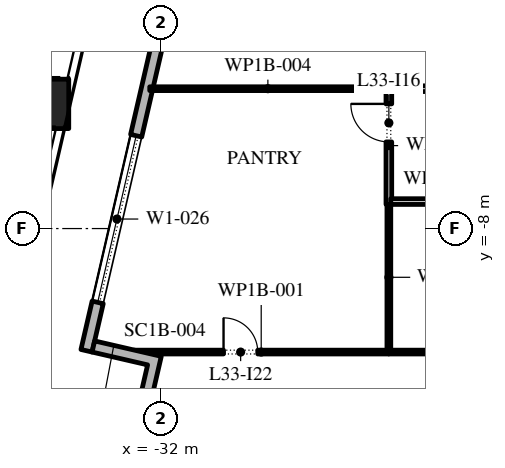
"""IFC4 building model, lengths in metres.
Left out: names, types, materials, properties, quantities, classifications, styles, units other than length and angle.
Written with IfcOpenShell. Run it as: python <this file> out.ifc"""

import sys

from ifc_helpers import new_model, si_unit, direction, frame, frame_2d, origin, origin_2d, place, context, subcontext, project, spatial, polyline, rectangle, outline, extrude, element, fill, save


model = new_model("IFC4")
c1 = context("Model", 3, precision=1e-05, world=origin(), true_north=direction((0.0, 1.0)))
c2 = subcontext(c1, "Body", "Model", "MODEL_VIEW")
j1 = project(units=[si_unit("LENGTHUNIT", "METRE"), si_unit("PLANEANGLEUNIT", "RADIAN")], contexts=[c1])
p1 = place(None, origin())
s1 = spatial("IfcSite", under=j1, at=p1, CompositionType="ELEMENT")
p2 = place(p1, origin())
s2 = spatial("IfcBuilding", under=s1, at=p2, CompositionType="ELEMENT")
p3 = place(p2, frame((0.0, 0.0, 151.8)))
s3 = spatial("IfcBuildingStorey", under=s2, at=p3, CompositionType="ELEMENT", Elevation=151.8)
p4 = place(p3, frame((-35.073, -4.72, 0.0), z_axis=(0.002964348167, 0.012671135303, 0.9999153239), x_axis=(-0.973709261374, 0.227794368487, 0.0)))
e1 = element("IfcColumn", 1, at=p4, inside=s3, PredefinedType="COLUMN", context=c2, shape_type="SweptSolid", body=[
    extrude(rectangle(XDim=1.3, YDim=1.3, at=origin_2d()), origin(), (0.0, 0.0, 1.0), 4.2),
])
p5 = place(p3, frame((-22.82, 37.016, 0.0), z_axis=(0.0, 0.0, 1.0), x_axis=(-0.224953880882, -0.974369412223, 0.0)))
e2 = element("IfcWall", 2, at=p5, inside=s3, PredefinedType="STANDARD", context=c2, shape_type="SweptSolid", body=[
    extrude(rectangle(XDim=49.5, YDim=0.3, at=frame_2d((24.75, 0.0))), origin(), (0.0, 0.0, 1.0), 3.95),
])
p6 = place(p5, frame((1.157, 0.0, 0.45)))
e3 = element("IfcOpeningElement", 3, at=p6, cuts=e2, PredefinedType="OPENING", context=c2, shape_type="SweptSolid", body=[
    extrude(rectangle(XDim=4.5, YDim=3.05, at=frame_2d((2.25, 1.525))), frame((0.0, 0.16, 0.0), z_axis=(0.0, -1.0, 0.0), x_axis=(1.0, 0.0, 0.0)), (0.0, 0.0, 1.0), 0.32),
])
p7 = place(p5, frame((8.121, 0.0, 0.45)))
e4 = element("IfcOpeningElement", 4, at=p7, cuts=e2, PredefinedType="OPENING", context=c2, shape_type="SweptSolid", body=[
    extrude(rectangle(XDim=4.5, YDim=3.0, at=frame_2d((2.25, 1.5))), frame((0.0, 0.16, 0.0), z_axis=(0.0, -1.0, 0.0), x_axis=(1.0, 0.0, 0.0)), (0.0, 0.0, 1.0), 0.32),
])
p8 = place(p5, frame((15.236, 0.0, 0.45)))
e5 = element("IfcOpeningElement", 5, at=p8, cuts=e2, PredefinedType="OPENING", context=c2, shape_type="SweptSolid", body=[
    extrude(rectangle(XDim=4.5, YDim=3.0, at=frame_2d((2.25, 1.5))), frame((0.0, 0.16, 0.0), z_axis=(0.0, -1.0, 0.0), x_axis=(1.0, 0.0, 0.0)), (0.0, 0.0, 1.0), 0.32),
])
p9 = place(p5, frame((23.4, 0.0, 0.0)))
e6 = element("IfcOpeningElement", 6, at=p9, cuts=e2, PredefinedType="OPENING", context=c2, shape_type="SweptSolid", body=[
    extrude(rectangle(XDim=2.4, YDim=3.5, at=frame_2d((1.2, 1.75))), frame((0.0, 0.16, 0.0), z_axis=(0.0, -1.0, 0.0), x_axis=(1.0, 0.0, 0.0)), (0.0, 0.0, 1.0), 0.32),
])
p10 = place(p5, frame((29.464, 0.0, 0.45)))
e7 = element("IfcOpeningElement", 7, at=p10, cuts=e2, PredefinedType="OPENING", context=c2, shape_type="SweptSolid", body=[
    extrude(rectangle(XDim=4.5, YDim=2.825, at=frame_2d((2.25, 1.413))), frame((0.0, 0.16, 0.0), z_axis=(0.0, -1.0, 0.0), x_axis=(1.0, 0.0, 0.0)), (0.0, 0.0, 1.0), 0.32),
])
p11 = place(p5, frame((36.579, 0.0, 0.45)))
e8 = element("IfcOpeningElement", 8, at=p11, cuts=e2, PredefinedType="OPENING", context=c2, shape_type="SweptSolid", body=[
    extrude(rectangle(XDim=4.5, YDim=2.625, at=frame_2d((2.25, 1.312))), frame((0.0, 0.16, 0.0), z_axis=(0.0, -1.0, 0.0), x_axis=(1.0, 0.0, 0.0)), (0.0, 0.0, 1.0), 0.32),
])
p12 = place(p5, frame((43.693, 0.0, 0.45)))
e9 = element("IfcOpeningElement", 9, at=p12, cuts=e2, PredefinedType="OPENING", context=c2, shape_type="SweptSolid", body=[
    extrude(rectangle(XDim=4.5, YDim=3.05, at=frame_2d((2.25, 1.525))), frame((0.0, 0.16, 0.0), z_axis=(0.0, -1.0, 0.0), x_axis=(1.0, 0.0, 0.0)), (0.0, 0.0, 1.0), 0.32),
])
p13 = place(p3, origin())
e10 = element("IfcWall", 10, at=p13, inside=s3, PredefinedType="STANDARD", context=c2, shape_type="SweptSolid", body=[
    extrude(outline(polyline([(-32.393, -13.116), (-30.639, -13.521), (-31.111, -15.567), (-31.404, -15.5), (-30.999, -13.746), (-32.753, -13.341), (-32.348, -11.587), (-33.809, -11.25), (-33.742, -10.957), (-31.988, -11.362), (-32.393, -13.116)])), origin(), (0.0, 0.0, 1.0), 3.95),
])
p14 = place(p3, frame((-26.0, -11.25, 0.0), z_axis=(0.0, 0.0, 1.0), x_axis=(-1.0, 0.0, 0.0)))
e11 = element("IfcWall", 11, at=p14, inside=s3, PredefinedType="PARTITIONING", context=c2, shape_type="SweptSolid", body=[
    extrude(rectangle(XDim=6.718, YDim=0.1, at=frame_2d((3.359, 0.0))), origin(), (0.0, 0.0, 1.0), 3.95),
])
p15 = place(p14, frame((3.45, 0.0, 0.0)))
e12 = element("IfcOpeningElement", 12, at=p15, cuts=e11, PredefinedType="OPENING", context=c2, shape_type="SweptSolid", body=[
    extrude(rectangle(XDim=0.9, YDim=2.1, at=frame_2d((0.45, 1.05))), frame((0.0, 0.06, 0.0), z_axis=(0.0, -1.0, 0.0), x_axis=(1.0, 0.0, 0.0)), (0.0, 0.0, 1.0), 0.12),
])
p16 = place(p3, frame((-26.0, -11.2, 0.0), z_axis=(0.0, 0.0, 1.0), x_axis=(0.0, 1.0, 0.0)))
e13 = element("IfcWall", 13, at=p16, inside=s3, PredefinedType="PARTITIONING", context=c2, shape_type="SweptSolid", body=[
    extrude(rectangle(XDim=3.835, YDim=0.1, at=frame_2d((1.917, 0.0))), origin(), (0.0, 0.0, 1.0), 3.114),
])
p17 = place(p3, frame((-26.0, -7.365, 0.0), z_axis=(0.0, 0.0, 1.0), x_axis=(0.0, 1.0, 0.0)))
e14 = element("IfcWall", 14, at=p17, inside=s3, PredefinedType="PARTITIONING", context=c2, shape_type="SweptSolid", body=[
    extrude(rectangle(XDim=3.095, YDim=0.15, at=frame_2d((1.547, 0.0))), origin(), (0.0, 0.0, 1.0), 3.114),
])
p18 = place(p17, frame((1.645, 0.0, 0.0)))
e15 = element("IfcOpeningElement", 15, at=p18, cuts=e14, PredefinedType="OPENING", context=c2, shape_type="SweptSolid", body=[
    extrude(rectangle(XDim=1.0, YDim=2.1, at=frame_2d((0.5, 1.05))), frame((0.0, 0.085, 0.0), z_axis=(0.0, -1.0, 0.0), x_axis=(1.0, 0.0, 0.0)), (0.0, 0.0, 1.0), 0.17),
])
p19 = place(p3, frame((-26.075, -4.32, 0.0), z_axis=(0.0, 0.0, 1.0), x_axis=(-1.0, 0.0, 0.0)))
e16 = element("IfcWall", 16, at=p19, inside=s3, PredefinedType="PARTITIONING", context=c2, shape_type="SweptSolid", body=[
    extrude(rectangle(XDim=6.217, YDim=0.1, at=frame_2d((3.108, 0.0))), origin(), (0.0, 0.0, 1.0), 3.95),
])
p20 = place(p3, frame((-25.925, -4.32, 0.0), z_axis=(0.0, 0.0, 1.0), x_axis=(1.0, 0.0, 0.0)))
e17 = element("IfcWall", 17, at=p20, inside=s3, PredefinedType="PARTITIONING", context=c2, shape_type="SweptSolid", body=[
    extrude(rectangle(XDim=2.4, YDim=0.15, at=frame_2d((1.2, 0.0))), origin(), (0.0, 0.0, 1.0), 3.95),
])
p21 = place(p3, frame((-23.6, -7.29, 0.0), z_axis=(0.0, 0.0, 1.0), x_axis=(-1.0, 0.0, 0.0)))
e18 = element("IfcWall", 18, at=p21, inside=s3, PredefinedType="PARTITIONING", context=c2, shape_type="SweptSolid", body=[
    extrude(rectangle(XDim=2.35, YDim=0.15, at=frame_2d((1.175, 0.0))), origin(), (0.0, 0.0, 1.0), 3.95),
])
p22 = place(p3, frame((-18.7, -11.25, 0.0), z_axis=(0.0, 0.0, 1.0), x_axis=(-1.0, 0.0, 0.0)))
e19 = element("IfcWall", 19, at=p22, inside=s3, PredefinedType="PARTITIONING", context=c2, shape_type="SweptSolid", body=[
    extrude(rectangle(XDim=7.3, YDim=0.1, at=frame_2d((3.65, 0.0))), origin(), (0.0, 0.0, 1.0), 3.95),
])
p23 = place(p12, origin())
e20 = element("IfcWindow", 20, at=p23, inside=s3, PartitioningType="DOUBLE_PANEL_VERTICAL", PredefinedType="WINDOW", context=c2, shape_type="SweptSolid", body=[
    extrude(rectangle(XDim=4.5, YDim=3.05, at=frame_2d((2.25, 1.525))), frame((0.0, 0.03, 0.0), z_axis=(0.0, -1.0, 0.0), x_axis=(1.0, 0.0, 0.0)), (0.0, 0.0, 1.0), 0.06),
])
fill(e9, e20)
p24 = place(p18, origin())
e21 = element("IfcDoor", 21, at=p24, inside=s3, OperationType="SINGLE_SWING_LEFT", PredefinedType="DOOR", context=c2, shape_type="SweptSolid", body=[
    extrude(rectangle(XDim=1.0, YDim=2.1, at=frame_2d((0.5, 1.05))), frame((0.0, 0.025, 0.0), z_axis=(0.0, -1.0, 0.0), x_axis=(1.0, 0.0, 0.0)), (0.0, 0.0, 1.0), 0.05),
])
fill(e15, e21)
p25 = place(p15, frame((0.9, 0.0, 0.0), z_axis=(0.0, 0.0, 1.0), x_axis=(-1.0, 0.0, 0.0)))
e22 = element("IfcDoor", 22, at=p25, inside=s3, OperationType="SINGLE_SWING_RIGHT", PredefinedType="DOOR", context=c2, shape_type="SweptSolid", body=[
    extrude(rectangle(XDim=0.9, YDim=2.1, at=frame_2d((0.45, 1.05))), frame((0.0, 0.025, 0.0), z_axis=(0.0, -1.0, 0.0), x_axis=(1.0, 0.0, 0.0)), (0.0, 0.0, 1.0), 0.05),
])
fill(e12, e22)
save(model, sys.argv[1])
